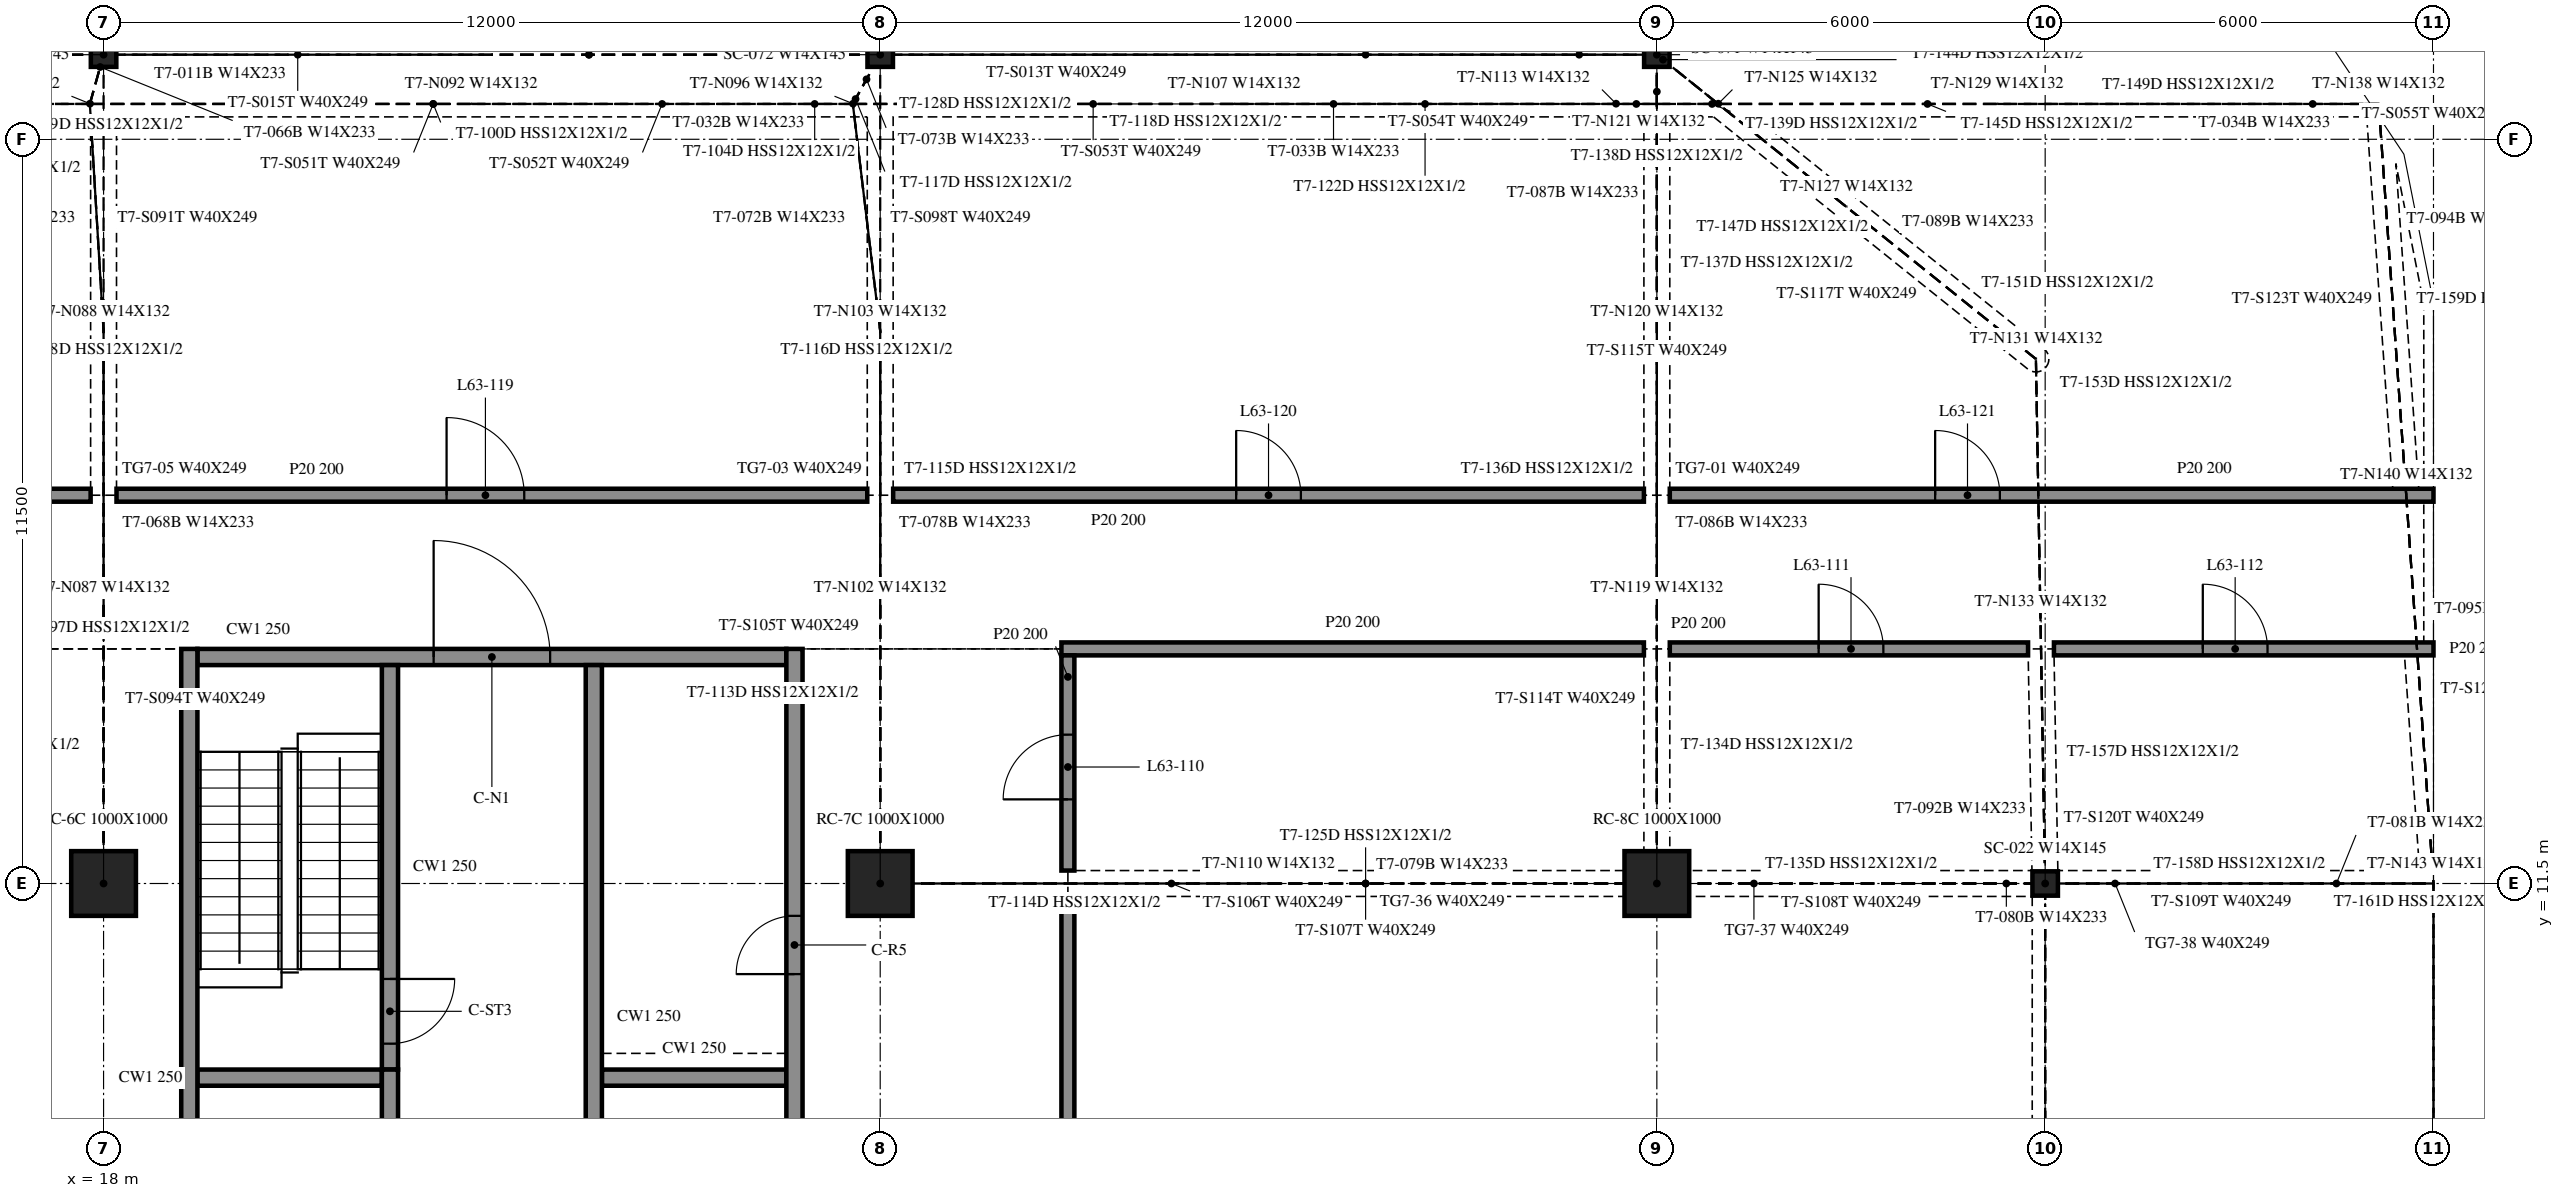
"""IFC4 building model, lengths in metres.
Left out: names, types, materials, properties, quantities, classifications, styles, units other than length and angle.
Written with IfcOpenShell. Run it as: python <this file> out.ifc"""

import sys

from ifc_helpers import new_model, si_unit, direction, frame, frame_2d, origin, origin_2d, place, context, subcontext, project, spatial, rectangle, i_section, extrude, element, fill, save


model = new_model("IFC4")
c1 = context("Model", 3, precision=1e-05, world=origin(), true_north=direction((0.0, 1.0)))
c2 = subcontext(c1, "Body", "Model", "MODEL_VIEW")
j1 = project(units=[si_unit("LENGTHUNIT", "METRE"), si_unit("PLANEANGLEUNIT", "RADIAN")], contexts=[c1])
p1 = place(None, origin())
s1 = spatial("IfcSite", under=j1, at=p1, CompositionType="ELEMENT")
p2 = place(p1, origin())
s2 = spatial("IfcBuilding", under=s1, at=p2, CompositionType="ELEMENT")
p3 = place(p2, frame((0.0, 0.0, 259.0)))
s3 = spatial("IfcBuildingStorey", under=s2, at=p3, CompositionType="ELEMENT", Elevation=259.0)
for number, where, z_axis, x_axis in (
    (1, (18.0, 11.5, -0.4), (0.0, 0.0, 1.0), (1.0, 0.0, 0.0)),
    (2, (30.0, 11.5, -0.4), (0.0, 0.0, 1.0), (1.0, 0.0, 0.0)),
    (3, (42.0, 11.5, -0.4), (0.0, 0.0, 1.0), (1.0, 0.0, 0.0)),
):
    element("IfcColumn", number, at=place(p3, frame(where, z_axis=z_axis, x_axis=x_axis)), inside=s3, PredefinedType="COLUMN", context=c2, shape_type="SweptSolid", body=[
        extrude(rectangle(XDim=1.0, YDim=1.0, at=origin_2d()), origin(), (0.0, 0.0, 1.0), 4.36),
    ])
for number, where, z_axis, x_axis in (
    (4, (42.0, 24.307, -0.4), (0.0, 0.0, 1.0), (1.0, 0.0, 0.0)),
    (5, (30.0, 24.307, -0.4), (0.0, 0.0, 1.0), (1.0, 0.0, 0.0)),
    (6, (18.0, 24.307, -0.4), (0.0, 0.0, 1.0), (1.0, 0.0, 0.0)),
    (7, (48.0, 11.5, -0.4), (0.0, 0.0, 1.0), (1.0, 0.0, 0.0)),
):
    element("IfcColumn", number, at=place(p3, frame(where, z_axis=z_axis, x_axis=x_axis)), inside=s3, PredefinedType="COLUMN", context=c2, shape_type="SweptSolid", body=[
        extrude(i_section(OverallWidth=0.394, OverallDepth=0.376, WebThickness=0.017, FlangeThickness=0.028, at=origin_2d()), origin(), (0.0, 0.0, 1.0), 4.36),
    ])
p4 = place(p3, frame((19.325, 15.125, 0.0), z_axis=(0.0, 0.0, 1.0), x_axis=(0.0, -1.0, 0.0)))
e8 = element("IfcWall", 8, at=p4, inside=s3, PredefinedType="SOLIDWALL", context=c2, shape_type="SweptSolid", body=[
    extrude(rectangle(XDim=24.25, YDim=0.25, at=frame_2d((12.125, 0.0))), origin(), (0.0, 0.0, 1.0), 3.96),
])
p5 = place(p3, frame((28.675, -9.125, 0.0), z_axis=(0.0, 0.0, 1.0), x_axis=(0.0, 1.0, 0.0)))
e9 = element("IfcWall", 9, at=p5, inside=s3, PredefinedType="SOLIDWALL", context=c2, shape_type="SweptSolid", body=[
    extrude(rectangle(XDim=24.25, YDim=0.25, at=frame_2d((12.125, 0.0))), origin(), (0.0, 0.0, 1.0), 3.96),
])
p6 = place(p5, frame((14.425, 0.0, 0.0)))
e10 = element("IfcOpeningElement", 10, at=p6, cuts=e9, PredefinedType="OPENING", context=c2, shape_type="SweptSolid", body=[
    extrude(rectangle(XDim=0.9, YDim=2.1, at=frame_2d((0.45, 1.05))), frame((0.0, 0.135, 0.0), z_axis=(0.0, -1.0, 0.0), x_axis=(1.0, 0.0, 0.0)), (0.0, 0.0, 1.0), 0.27),
])
p7 = place(p5, frame((19.225, 0.0, 0.0)))
e11 = element("IfcOpeningElement", 11, at=p7, cuts=e9, PredefinedType="OPENING", context=c2, shape_type="SweptSolid", body=[
    extrude(rectangle(XDim=0.9, YDim=2.1, at=frame_2d((0.45, 1.05))), frame((0.0, 0.135, 0.0), z_axis=(0.0, -1.0, 0.0), x_axis=(1.0, 0.0, 0.0)), (0.0, 0.0, 1.0), 0.27),
])
p8 = place(p3, frame((19.45, 15.0, 0.0), z_axis=(0.0, 0.0, 1.0), x_axis=(1.0, 0.0, 0.0)))
e12 = element("IfcWall", 12, at=p8, inside=s3, PredefinedType="SOLIDWALL", context=c2, shape_type="SweptSolid", body=[
    extrude(rectangle(XDim=9.1, YDim=0.25, at=frame_2d((4.55, 0.0))), origin(), (0.0, 0.0, 1.0), 3.96),
])
p9 = place(p8, frame((3.65, 0.0, 0.0)))
e13 = element("IfcOpeningElement", 13, at=p9, cuts=e12, PredefinedType="OPENING", context=c2, shape_type="SweptSolid", body=[
    extrude(rectangle(XDim=1.8, YDim=2.1, at=frame_2d((0.9, 1.05))), frame((0.0, 0.135, 0.0), z_axis=(0.0, -1.0, 0.0), x_axis=(1.0, 0.0, 0.0)), (0.0, 0.0, 1.0), 0.27),
])
p10 = place(p3, frame((22.425, -9.125, 0.0), z_axis=(0.0, 0.0, 1.0), x_axis=(0.0, 1.0, 0.0)))
e14 = element("IfcWall", 14, at=p10, inside=s3, PredefinedType="SOLIDWALL", context=c2, shape_type="SweptSolid", body=[
    extrude(rectangle(XDim=17.75, YDim=0.25, at=frame_2d((8.875, 0.0))), origin(), (0.0, 0.0, 1.0), 3.96),
])
p11 = place(p10, frame((7.45, 0.0, 0.0)))
e15 = element("IfcOpeningElement", 15, at=p11, cuts=e14, PredefinedType="OPENING", context=c2, shape_type="SweptSolid", body=[
    extrude(rectangle(XDim=1.1, YDim=2.1, at=frame_2d((0.55, 1.05))), frame((0.0, 0.135, 0.0), z_axis=(0.0, -1.0, 0.0), x_axis=(1.0, 0.0, 0.0)), (0.0, 0.0, 1.0), 0.27),
])
p12 = place(p10, frame((10.2, 0.0, 0.0)))
e16 = element("IfcOpeningElement", 16, at=p12, cuts=e14, PredefinedType="OPENING", context=c2, shape_type="SweptSolid", body=[
    extrude(rectangle(XDim=1.1, YDim=2.1, at=frame_2d((0.55, 1.05))), frame((0.0, 0.135, 0.0), z_axis=(0.0, -1.0, 0.0), x_axis=(1.0, 0.0, 0.0)), (0.0, 0.0, 1.0), 0.27),
])
p13 = place(p10, frame((12.95, 0.0, 0.0)))
e17 = element("IfcOpeningElement", 17, at=p13, cuts=e14, PredefinedType="OPENING", context=c2, shape_type="SweptSolid", body=[
    extrude(rectangle(XDim=1.1, YDim=2.1, at=frame_2d((0.55, 1.05))), frame((0.0, 0.135, 0.0), z_axis=(0.0, -1.0, 0.0), x_axis=(1.0, 0.0, 0.0)), (0.0, 0.0, 1.0), 0.27),
])
p14 = place(p10, frame((15.7, 0.0, 0.0)))
e18 = element("IfcOpeningElement", 18, at=p14, cuts=e14, PredefinedType="OPENING", context=c2, shape_type="SweptSolid", body=[
    extrude(rectangle(XDim=1.1, YDim=2.1, at=frame_2d((0.55, 1.05))), frame((0.0, 0.135, 0.0), z_axis=(0.0, -1.0, 0.0), x_axis=(1.0, 0.0, 0.0)), (0.0, 0.0, 1.0), 0.27),
])
p15 = place(p10, frame((1.262, 0.0, 0.0)))
e19 = element("IfcOpeningElement", 19, at=p15, cuts=e14, PredefinedType="OPENING", context=c2, shape_type="SweptSolid", body=[
    extrude(rectangle(XDim=0.9, YDim=2.1, at=frame_2d((0.45, 1.05))), frame((0.0, 0.135, 0.0), z_axis=(0.0, -1.0, 0.0), x_axis=(1.0, 0.0, 0.0)), (0.0, 0.0, 1.0), 0.27),
])
p16 = place(p10, frame((4.337, 0.0, 0.0)))
e20 = element("IfcOpeningElement", 20, at=p16, cuts=e14, PredefinedType="OPENING", context=c2, shape_type="SweptSolid", body=[
    extrude(rectangle(XDim=0.9, YDim=2.1, at=frame_2d((0.45, 1.05))), frame((0.0, 0.135, 0.0), z_axis=(0.0, -1.0, 0.0), x_axis=(1.0, 0.0, 0.0)), (0.0, 0.0, 1.0), 0.27),
])
p17 = place(p3, frame((22.425, 14.875, 0.0), z_axis=(0.0, 0.0, 1.0), x_axis=(0.0, -1.0, 0.0)))
e21 = element("IfcWall", 21, at=p17, inside=s3, PredefinedType="SOLIDWALL", context=c2, shape_type="SweptSolid", body=[
    extrude(rectangle(XDim=6.25, YDim=0.25, at=frame_2d((3.125, 0.0))), origin(), (0.0, 0.0, 1.0), 3.96),
])
p18 = place(p17, frame((4.85, 0.0, 0.0)))
e22 = element("IfcOpeningElement", 22, at=p18, cuts=e21, PredefinedType="OPENING", context=c2, shape_type="SweptSolid", body=[
    extrude(rectangle(XDim=1.0, YDim=2.1, at=frame_2d((0.5, 1.05))), frame((0.0, 0.135, 0.0), z_axis=(0.0, -1.0, 0.0), x_axis=(1.0, 0.0, 0.0)), (0.0, 0.0, 1.0), 0.27),
])
p19 = place(p3, frame((25.575, 14.875, 0.0), z_axis=(0.0, 0.0, 1.0), x_axis=(0.0, -1.0, 0.0)))
e23 = element("IfcWall", 23, at=p19, inside=s3, PredefinedType="SOLIDWALL", context=c2, shape_type="SweptSolid", body=[
    extrude(rectangle(XDim=17.5, YDim=0.25, at=frame_2d((8.75, 0.0))), origin(), (0.0, 0.0, 1.0), 3.96),
])
p20 = place(p19, frame((15.45, 0.0, 0.0)))
e24 = element("IfcOpeningElement", 24, at=p20, cuts=e23, PredefinedType="OPENING", context=c2, shape_type="SweptSolid", body=[
    extrude(rectangle(XDim=1.1, YDim=2.1, at=frame_2d((0.55, 1.05))), frame((0.0, 0.135, 0.0), z_axis=(0.0, -1.0, 0.0), x_axis=(1.0, 0.0, 0.0)), (0.0, 0.0, 1.0), 0.27),
])
p21 = place(p19, frame((12.8, 0.0, 0.0)))
e25 = element("IfcOpeningElement", 25, at=p21, cuts=e23, PredefinedType="OPENING", context=c2, shape_type="SweptSolid", body=[
    extrude(rectangle(XDim=0.9, YDim=2.1, at=frame_2d((0.45, 1.05))), frame((0.0, 0.135, 0.0), z_axis=(0.0, -1.0, 0.0), x_axis=(1.0, 0.0, 0.0)), (0.0, 0.0, 1.0), 0.27),
])
for number, where, z_axis, x_axis in (
    (26, (19.45, 8.5, 0.0), (0.0, 0.0, 1.0), (1.0, 0.0, 0.0)),
    (27, (25.7, 8.5, 0.0), (0.0, 0.0, 1.0), (1.0, 0.0, 0.0)),
):
    element("IfcWall", number, at=place(p3, frame(where, z_axis=z_axis, x_axis=x_axis)), inside=s3, PredefinedType="SOLIDWALL", context=c2, shape_type="SweptSolid", body=[
        extrude(rectangle(XDim=2.85, YDim=0.25, at=frame_2d((1.425, 0.0))), origin(), (0.0, 0.0, 1.0), 3.96),
    ])
p22 = place(p3, frame((32.8, 15.125, 0.0), z_axis=(0.0, 0.0, 1.0), x_axis=(1.0, 0.0, 0.0)))
e28 = element("IfcWall", 28, at=p22, inside=s3, PredefinedType="PARTITIONING", context=c2, shape_type="SweptSolid", body=[
    extrude(rectangle(XDim=9.0, YDim=0.2, at=frame_2d((4.5, 0.0))), origin(), (0.0, 0.0, 1.0), 3.96),
])
p23 = place(p3, frame((42.2, 15.125, 0.0), z_axis=(0.0, 0.0, 1.0), x_axis=(1.0, 0.0, 0.0)))
e29 = element("IfcWall", 29, at=p23, inside=s3, PredefinedType="PARTITIONING", context=c2, shape_type="SweptSolid", body=[
    extrude(rectangle(XDim=5.536, YDim=0.2, at=frame_2d((2.768, 0.0))), origin(), (0.0, 0.0, 1.0), 3.96),
])
p24 = place(p23, frame((2.3, 0.0, 0.0)))
e30 = element("IfcOpeningElement", 30, at=p24, cuts=e29, PredefinedType="OPENING", context=c2, shape_type="SweptSolid", body=[
    extrude(rectangle(XDim=1.0, YDim=2.1, at=frame_2d((0.5, 1.05))), frame((0.0, 0.11, 0.0), z_axis=(0.0, -1.0, 0.0), x_axis=(1.0, 0.0, 0.0)), (0.0, 0.0, 1.0), 0.22),
])
p25 = place(p3, frame((48.135, 15.125, 0.0), z_axis=(0.0, 0.0, 1.0), x_axis=(1.0, 0.0, 0.0)))
e31 = element("IfcWall", 31, at=p25, inside=s3, PredefinedType="PARTITIONING", context=c2, shape_type="SweptSolid", body=[
    extrude(rectangle(XDim=5.865, YDim=0.2, at=frame_2d((2.932, 0.0))), origin(), (0.0, 0.0, 1.0), 3.96),
])
p26 = place(p25, frame((2.3, 0.0, 0.0)))
e32 = element("IfcOpeningElement", 32, at=p26, cuts=e31, PredefinedType="OPENING", context=c2, shape_type="SweptSolid", body=[
    extrude(rectangle(XDim=1.0, YDim=2.1, at=frame_2d((0.5, 1.05))), frame((0.0, 0.11, 0.0), z_axis=(0.0, -1.0, 0.0), x_axis=(1.0, 0.0, 0.0)), (0.0, 0.0, 1.0), 0.22),
])
p27 = place(p3, frame((6.2, 17.5, 0.0), z_axis=(0.0, 0.0, 1.0), x_axis=(1.0, 0.0, 0.0)))
e33 = element("IfcWall", 33, at=p27, inside=s3, PredefinedType="PARTITIONING", context=c2, shape_type="SweptSolid", body=[
    extrude(rectangle(XDim=11.6, YDim=0.2, at=frame_2d((5.8, 0.0))), origin(), (0.0, 0.0, 1.0), 3.96),
])
p28 = place(p27, frame((5.1, 0.0, 0.0)))
e34 = element("IfcOpeningElement", 34, at=p28, cuts=e33, PredefinedType="OPENING", context=c2, shape_type="SweptSolid", body=[
    extrude(rectangle(XDim=1.2, YDim=2.1, at=frame_2d((0.6, 1.05))), frame((0.0, 0.11, 0.0), z_axis=(0.0, -1.0, 0.0), x_axis=(1.0, 0.0, 0.0)), (0.0, 0.0, 1.0), 0.22),
])
p29 = place(p3, frame((18.2, 17.5, 0.0), z_axis=(0.0, 0.0, 1.0), x_axis=(1.0, 0.0, 0.0)))
e35 = element("IfcWall", 35, at=p29, inside=s3, PredefinedType="PARTITIONING", context=c2, shape_type="SweptSolid", body=[
    extrude(rectangle(XDim=11.6, YDim=0.2, at=frame_2d((5.8, 0.0))), origin(), (0.0, 0.0, 1.0), 3.96),
])
p30 = place(p29, frame((5.1, 0.0, 0.0)))
e36 = element("IfcOpeningElement", 36, at=p30, cuts=e35, PredefinedType="OPENING", context=c2, shape_type="SweptSolid", body=[
    extrude(rectangle(XDim=1.2, YDim=2.1, at=frame_2d((0.6, 1.05))), frame((0.0, 0.11, 0.0), z_axis=(0.0, -1.0, 0.0), x_axis=(1.0, 0.0, 0.0)), (0.0, 0.0, 1.0), 0.22),
])
p31 = place(p3, frame((30.2, 17.5, 0.0), z_axis=(0.0, 0.0, 1.0), x_axis=(1.0, 0.0, 0.0)))
e37 = element("IfcWall", 37, at=p31, inside=s3, PredefinedType="PARTITIONING", context=c2, shape_type="SweptSolid", body=[
    extrude(rectangle(XDim=11.6, YDim=0.2, at=frame_2d((5.8, 0.0))), origin(), (0.0, 0.0, 1.0), 3.96),
])
p32 = place(p31, frame((5.3, 0.0, 0.0)))
e38 = element("IfcOpeningElement", 38, at=p32, cuts=e37, PredefinedType="OPENING", context=c2, shape_type="SweptSolid", body=[
    extrude(rectangle(XDim=1.0, YDim=2.1, at=frame_2d((0.5, 1.05))), frame((0.0, 0.11, 0.0), z_axis=(0.0, -1.0, 0.0), x_axis=(1.0, 0.0, 0.0)), (0.0, 0.0, 1.0), 0.22),
])
p33 = place(p3, frame((42.2, 17.5, 0.0), z_axis=(0.0, 0.0, 1.0), x_axis=(1.0, 0.0, 0.0)))
e39 = element("IfcWall", 39, at=p33, inside=s3, PredefinedType="PARTITIONING", context=c2, shape_type="SweptSolid", body=[
    extrude(rectangle(XDim=11.8, YDim=0.2, at=frame_2d((5.9, 0.0))), origin(), (0.0, 0.0, 1.0), 3.96),
])
p34 = place(p33, frame((4.1, 0.0, 0.0)))
e40 = element("IfcOpeningElement", 40, at=p34, cuts=e39, PredefinedType="OPENING", context=c2, shape_type="SweptSolid", body=[
    extrude(rectangle(XDim=1.0, YDim=2.1, at=frame_2d((0.5, 1.05))), frame((0.0, 0.11, 0.0), z_axis=(0.0, -1.0, 0.0), x_axis=(1.0, 0.0, 0.0)), (0.0, 0.0, 1.0), 0.22),
])
p35 = place(p3, frame((32.9, 0.2, 0.0), z_axis=(0.0, 0.0, 1.0), x_axis=(0.0, 1.0, 0.0)))
e41 = element("IfcWall", 41, at=p35, inside=s3, PredefinedType="PARTITIONING", context=c2, shape_type="SweptSolid", body=[
    extrude(rectangle(XDim=11.1, YDim=0.2, at=frame_2d((5.55, 0.0))), origin(), (0.0, 0.0, 1.0), 3.96),
])
p36 = place(p35, frame((5.1, 0.0, 0.0)))
e42 = element("IfcOpeningElement", 42, at=p36, cuts=e41, PredefinedType="OPENING", context=c2, shape_type="SweptSolid", body=[
    extrude(rectangle(XDim=1.0, YDim=2.1, at=frame_2d((0.5, 1.05))), frame((0.0, 0.11, 0.0), z_axis=(0.0, -1.0, 0.0), x_axis=(1.0, 0.0, 0.0)), (0.0, 0.0, 1.0), 0.22),
])
p37 = place(p3, frame((32.9, 11.7, 0.0), z_axis=(0.0, 0.0, 1.0), x_axis=(0.0, 1.0, 0.0)))
e43 = element("IfcWall", 43, at=p37, inside=s3, PredefinedType="PARTITIONING", context=c2, shape_type="SweptSolid", body=[
    extrude(rectangle(XDim=3.325, YDim=0.2, at=frame_2d((1.663, 0.0))), origin(), (0.0, 0.0, 1.0), 3.96),
])
p38 = place(p37, frame((1.1, 0.0, 0.0)))
e44 = element("IfcOpeningElement", 44, at=p38, cuts=e43, PredefinedType="OPENING", context=c2, shape_type="SweptSolid", body=[
    extrude(rectangle(XDim=1.0, YDim=2.1, at=frame_2d((0.5, 1.05))), frame((0.0, 0.11, 0.0), z_axis=(0.0, -1.0, 0.0), x_axis=(1.0, 0.0, 0.0)), (0.0, 0.0, 1.0), 0.22),
])
p39 = place(p9, origin())
e45 = element("IfcDoor", 45, at=p39, inside=s3, OperationType="DOUBLE_DOOR_SINGLE_SWING", PredefinedType="DOOR", context=c2, shape_type="SweptSolid", body=[
    extrude(rectangle(XDim=1.8, YDim=2.1, at=frame_2d((0.9, 1.05))), frame((0.0, 0.025, 0.0), z_axis=(0.0, -1.0, 0.0), x_axis=(1.0, 0.0, 0.0)), (0.0, 0.0, 1.0), 0.05),
])
fill(e13, e45)
p40 = place(p7, origin())
e46 = element("IfcDoor", 46, at=p40, inside=s3, OperationType="SINGLE_SWING_LEFT", PredefinedType="DOOR", context=c2, shape_type="SweptSolid", body=[
    extrude(rectangle(XDim=0.9, YDim=2.1, at=frame_2d((0.45, 1.05))), frame((0.0, 0.025, 0.0), z_axis=(0.0, -1.0, 0.0), x_axis=(1.0, 0.0, 0.0)), (0.0, 0.0, 1.0), 0.05),
])
fill(e11, e46)
p41 = place(p18, origin())
e47 = element("IfcDoor", 47, at=p41, inside=s3, OperationType="SINGLE_SWING_RIGHT", PredefinedType="DOOR", context=c2, shape_type="SweptSolid", body=[
    extrude(rectangle(XDim=1.0, YDim=2.1, at=frame_2d((0.5, 1.05))), frame((0.0, 0.025, 0.0), z_axis=(0.0, -1.0, 0.0), x_axis=(1.0, 0.0, 0.0)), (0.0, 0.0, 1.0), 0.05),
])
fill(e22, e47)
p42 = place(p38, origin())
e48 = element("IfcDoor", 48, at=p42, inside=s3, OperationType="SINGLE_SWING_RIGHT", PredefinedType="DOOR", context=c2, shape_type="SweptSolid", body=[
    extrude(rectangle(XDim=1.0, YDim=2.1, at=frame_2d((0.5, 1.05))), frame((0.0, 0.025, 0.0), z_axis=(0.0, -1.0, 0.0), x_axis=(1.0, 0.0, 0.0)), (0.0, 0.0, 1.0), 0.05),
])
fill(e44, e48)
p43 = place(p24, origin())
e49 = element("IfcDoor", 49, at=p43, inside=s3, OperationType="SINGLE_SWING_LEFT", PredefinedType="DOOR", context=c2, shape_type="SweptSolid", body=[
    extrude(rectangle(XDim=1.0, YDim=2.1, at=frame_2d((0.5, 1.05))), frame((0.0, 0.025, 0.0), z_axis=(0.0, -1.0, 0.0), x_axis=(1.0, 0.0, 0.0)), (0.0, 0.0, 1.0), 0.05),
])
fill(e30, e49)
p44 = place(p26, origin())
e50 = element("IfcDoor", 50, at=p44, inside=s3, OperationType="SINGLE_SWING_LEFT", PredefinedType="DOOR", context=c2, shape_type="SweptSolid", body=[
    extrude(rectangle(XDim=1.0, YDim=2.1, at=frame_2d((0.5, 1.05))), frame((0.0, 0.025, 0.0), z_axis=(0.0, -1.0, 0.0), x_axis=(1.0, 0.0, 0.0)), (0.0, 0.0, 1.0), 0.05),
])
fill(e32, e50)
p45 = place(p30, origin())
e51 = element("IfcDoor", 51, at=p45, inside=s3, OperationType="SINGLE_SWING_LEFT", PredefinedType="DOOR", context=c2, shape_type="SweptSolid", body=[
    extrude(rectangle(XDim=1.2, YDim=2.1, at=frame_2d((0.6, 1.05))), frame((0.0, 0.025, 0.0), z_axis=(0.0, -1.0, 0.0), x_axis=(1.0, 0.0, 0.0)), (0.0, 0.0, 1.0), 0.05),
])
fill(e36, e51)
p46 = place(p32, origin())
e52 = element("IfcDoor", 52, at=p46, inside=s3, OperationType="SINGLE_SWING_RIGHT", PredefinedType="DOOR", context=c2, shape_type="SweptSolid", body=[
    extrude(rectangle(XDim=1.0, YDim=2.1, at=frame_2d((0.5, 1.05))), frame((0.0, 0.025, 0.0), z_axis=(0.0, -1.0, 0.0), x_axis=(1.0, 0.0, 0.0)), (0.0, 0.0, 1.0), 0.05),
])
fill(e38, e52)
p47 = place(p34, origin())
e53 = element("IfcDoor", 53, at=p47, inside=s3, OperationType="SINGLE_SWING_LEFT", PredefinedType="DOOR", context=c2, shape_type="SweptSolid", body=[
    extrude(rectangle(XDim=1.0, YDim=2.1, at=frame_2d((0.5, 1.05))), frame((0.0, 0.025, 0.0), z_axis=(0.0, -1.0, 0.0), x_axis=(1.0, 0.0, 0.0)), (0.0, 0.0, 1.0), 0.05),
])
fill(e40, e53)
save(model, sys.argv[1])
